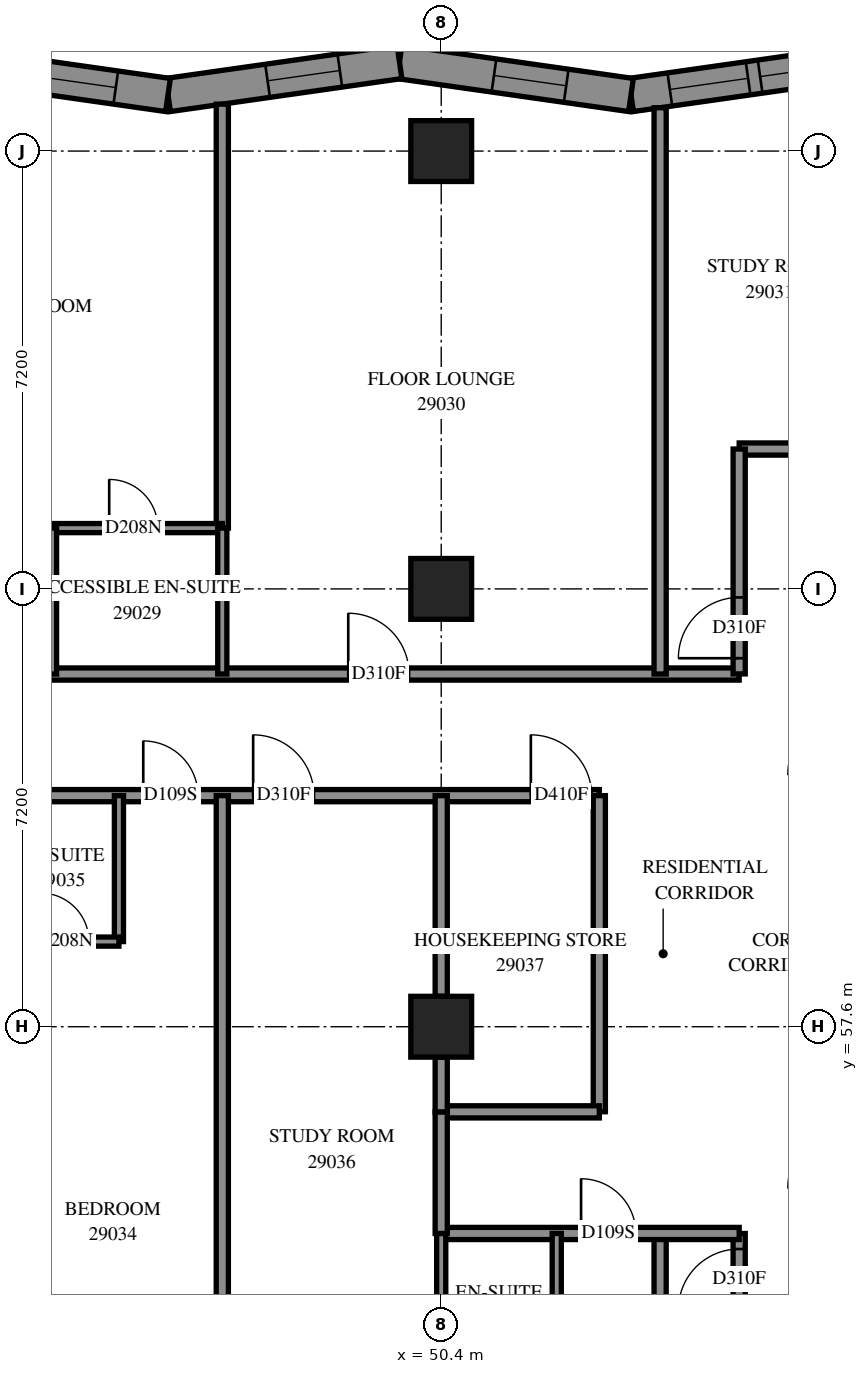
"""IFC4 building model, lengths in metres.
Left out: names, types, materials, properties, quantities, classifications, styles, units other than length and angle.
Written with IfcOpenShell. Run it as: python <this file> out.ifc"""

import sys

from ifc_helpers import new_model, si_unit, direction, frame, frame_2d, origin, origin_2d, place, context, subcontext, project, spatial, polyline, rectangle, outline, extrude, element, fill, save


model = new_model("IFC4")
c1 = context("Model", 3, precision=1e-05, world=origin(), true_north=direction((0.0, 1.0)))
c2 = subcontext(c1, "Body", "Model", "MODEL_VIEW")
j1 = project(units=[si_unit("LENGTHUNIT", "METRE"), si_unit("PLANEANGLEUNIT", "RADIAN")], contexts=[c1])
p1 = place(None, origin())
s1 = spatial("IfcSite", under=j1, at=p1, CompositionType="ELEMENT")
p2 = place(p1, origin())
s2 = spatial("IfcBuilding", under=s1, at=p2, CompositionType="ELEMENT")
p3 = place(p2, frame((0.0, 0.0, 108.4)))
s3 = spatial("IfcBuildingStorey", under=s2, at=p3, CompositionType="ELEMENT", Elevation=108.4)
for number, where, z_axis, x_axis in (
    (1, (50.4, 57.6, 0.0), (0.0, 0.0, 1.0), (1.0, 0.0, 0.0)),
    (2, (50.4, 64.8, 0.0), (0.0, 0.0, 1.0), (1.0, 0.0, 0.0)),
    (3, (50.4, 72.0, 0.0), (0.0, 0.0, 1.0), (1.0, 0.0, 0.0)),
):
    element("IfcColumn", number, at=place(p3, frame(where, z_axis=z_axis, x_axis=x_axis)), inside=s3, PredefinedType="COLUMN", context=c2, shape_type="SweptSolid", body=[
        extrude(rectangle(XDim=1.0, YDim=1.0, at=origin_2d()), origin(), (0.0, 0.0, 1.0), 3.1),
    ])
p4 = place(p3, frame((57.328, 73.464, 0.0), z_axis=(0.0, 0.0, 1.0), x_axis=(-0.990016994, -0.1409480459, 0.0)))
e4 = element("IfcWall", 4, at=p4, inside=s3, PredefinedType="SOLIDWALL", context=c2, shape_type="SweptSolid", body=[
    extrude(outline(polyline([(-0.039, -0.275), (3.806, -0.275), (3.885, 0.275), (0.039, 0.275), (-0.039, -0.275)])), origin(), (0.0, 0.0, 1.0), 3.1),
])
p5 = place(p4, frame((0.4, 0.0, 0.5)))
e5 = element("IfcOpeningElement", 5, at=p5, cuts=e4, PredefinedType="OPENING", context=c2, shape_type="SweptSolid", body=[
    extrude(rectangle(XDim=1.3, YDim=2.45, at=frame_2d((0.65, 1.225))), frame((0.0, 0.285, 0.0), z_axis=(0.0, -1.0, 0.0), x_axis=(1.0, 0.0, 0.0)), (0.0, 0.0, 1.0), 0.57),
])
p6 = place(p4, frame((1.9, 0.0, 0.5)))
e6 = element("IfcOpeningElement", 6, at=p6, cuts=e4, PredefinedType="OPENING", context=c2, shape_type="SweptSolid", body=[
    extrude(rectangle(XDim=1.3, YDim=2.45, at=frame_2d((0.65, 1.225))), frame((0.0, 0.285, 0.0), z_axis=(0.0, -1.0, 0.0), x_axis=(1.0, 0.0, 0.0)), (0.0, 0.0, 1.0), 0.57),
])
p7 = place(p3, frame((53.521, 72.922, 0.0), z_axis=(0.0, 0.0, 1.0), x_axis=(-0.990016994, 0.1409480459, 0.0)))
e7 = element("IfcWall", 7, at=p7, inside=s3, PredefinedType="SOLIDWALL", context=c2, shape_type="SweptSolid", body=[
    extrude(outline(polyline([(0.039, -0.275), (3.885, -0.275), (3.806, 0.275), (-0.039, 0.275), (0.039, -0.275)])), origin(), (0.0, 0.0, 1.0), 3.1),
])
p8 = place(p7, frame((1.076, 0.0, 0.5)))
e8 = element("IfcOpeningElement", 8, at=p8, cuts=e7, PredefinedType="OPENING", context=c2, shape_type="SweptSolid", body=[
    extrude(rectangle(XDim=1.2, YDim=2.45, at=frame_2d((0.6, 1.225))), frame((0.0, 0.285, 0.0), z_axis=(0.0, -1.0, 0.0), x_axis=(1.0, 0.0, 0.0)), (0.0, 0.0, 1.0), 0.57),
])
p9 = place(p3, frame((49.714, 73.464, 0.0), z_axis=(0.0, 0.0, 1.0), x_axis=(-0.990016994, -0.1409480459, 0.0)))
e9 = element("IfcWall", 9, at=p9, inside=s3, PredefinedType="SOLIDWALL", context=c2, shape_type="SweptSolid", body=[
    extrude(outline(polyline([(-0.039, -0.275), (3.806, -0.275), (3.885, 0.275), (0.039, 0.275), (-0.039, -0.275)])), origin(), (0.0, 0.0, 1.0), 3.1),
])
p10 = place(p9, frame((0.991, 0.0, 0.5)))
e10 = element("IfcOpeningElement", 10, at=p10, cuts=e9, PredefinedType="OPENING", context=c2, shape_type="SweptSolid", body=[
    extrude(rectangle(XDim=1.2, YDim=2.45, at=frame_2d((0.6, 1.225))), frame((0.0, 0.285, 0.0), z_axis=(0.0, -1.0, 0.0), x_axis=(1.0, 0.0, 0.0)), (0.0, 0.0, 1.0), 0.57),
])
p11 = place(p3, frame((45.907, 72.922, 0.0), z_axis=(0.0, 0.0, 1.0), x_axis=(-0.9900175106, 0.1409444172, 0.0)))
e11 = element("IfcWall", 11, at=p11, inside=s3, PredefinedType="SOLIDWALL", context=c2, shape_type="SweptSolid", body=[
    extrude(outline(polyline([(0.039, -0.275), (3.885, -0.275), (3.806, 0.275), (-0.039, 0.275), (0.039, -0.275)])), origin(), (0.0, 0.0, 1.0), 3.1),
])
p12 = place(p11, frame((0.867, 0.0, 0.5)))
e12 = element("IfcOpeningElement", 12, at=p12, cuts=e11, PredefinedType="OPENING", context=c2, shape_type="SweptSolid", body=[
    extrude(rectangle(XDim=1.2, YDim=2.45, at=frame_2d((0.6, 1.225))), frame((0.0, 0.285, 0.0), z_axis=(0.0, -1.0, 0.0), x_axis=(1.0, 0.0, 0.0)), (0.0, 0.0, 1.0), 0.57),
])
p13 = place(p3, frame((28.8, 61.4, 0.0), z_axis=(0.0, 0.0, 1.0), x_axis=(1.0, 0.0, 0.0)))
e13 = element("IfcWall", 13, at=p13, inside=s3, PredefinedType="PARTITIONING", context=c2, shape_type="SweptSolid", body=[
    extrude(rectangle(XDim=24.2, YDim=0.2, at=frame_2d((12.1, 0.0))), origin(), (0.0, 0.0, 1.0), 3.1),
])
p14 = place(p13, frame((2.3, 0.0, 0.0)))
e14 = element("IfcOpeningElement", 14, at=p14, cuts=e13, PredefinedType="OPENING", context=c2, shape_type="SweptSolid", body=[
    extrude(rectangle(XDim=0.9, YDim=2.1, at=frame_2d((0.45, 1.05))), frame((0.0, 0.11, 0.0), z_axis=(0.0, -1.0, 0.0), x_axis=(1.0, 0.0, 0.0)), (0.0, 0.0, 1.0), 0.22),
])
p15 = place(p13, frame((5.901, 0.0, 0.0)))
e15 = element("IfcOpeningElement", 15, at=p15, cuts=e13, PredefinedType="OPENING", context=c2, shape_type="SweptSolid", body=[
    extrude(rectangle(XDim=0.9, YDim=2.1, at=frame_2d((0.45, 1.05))), frame((0.0, 0.11, 0.0), z_axis=(0.0, -1.0, 0.0), x_axis=(1.0, 0.0, 0.0)), (0.0, 0.0, 1.0), 0.22),
])
p16 = place(p13, frame((11.307, 0.0, 0.0)))
e16 = element("IfcOpeningElement", 16, at=p16, cuts=e13, PredefinedType="OPENING", context=c2, shape_type="SweptSolid", body=[
    extrude(rectangle(XDim=1.0, YDim=2.1, at=frame_2d((0.5, 1.05))), frame((0.0, 0.11, 0.0), z_axis=(0.0, -1.0, 0.0), x_axis=(1.0, 0.0, 0.0)), (0.0, 0.0, 1.0), 0.22),
])
p17 = place(p13, frame((16.7, 0.0, 0.0)))
e17 = element("IfcOpeningElement", 17, at=p17, cuts=e13, PredefinedType="OPENING", context=c2, shape_type="SweptSolid", body=[
    extrude(rectangle(XDim=0.9, YDim=2.1, at=frame_2d((0.45, 1.05))), frame((0.0, 0.11, 0.0), z_axis=(0.0, -1.0, 0.0), x_axis=(1.0, 0.0, 0.0)), (0.0, 0.0, 1.0), 0.22),
])
p18 = place(p13, frame((18.508, 0.0, 0.0)))
e18 = element("IfcOpeningElement", 18, at=p18, cuts=e13, PredefinedType="OPENING", context=c2, shape_type="SweptSolid", body=[
    extrude(rectangle(XDim=1.0, YDim=2.1, at=frame_2d((0.5, 1.05))), frame((0.0, 0.11, 0.0), z_axis=(0.0, -1.0, 0.0), x_axis=(1.0, 0.0, 0.0)), (0.0, 0.0, 1.0), 0.22),
])
p19 = place(p13, frame((23.074, 0.0, 0.0)))
e19 = element("IfcOpeningElement", 19, at=p19, cuts=e13, PredefinedType="OPENING", context=c2, shape_type="SweptSolid", body=[
    extrude(rectangle(XDim=1.0, YDim=2.1, at=frame_2d((0.5, 1.05))), frame((0.0, 0.11, 0.0), z_axis=(0.0, -1.0, 0.0), x_axis=(1.0, 0.0, 0.0)), (0.0, 0.0, 1.0), 0.22),
])
p20 = place(p3, frame((33.4, 63.4, 0.0), z_axis=(0.0, 0.0, 1.0), x_axis=(1.0, 0.0, 0.0)))
e20 = element("IfcWall", 20, at=p20, inside=s3, PredefinedType="PARTITIONING", context=c2, shape_type="SweptSolid", body=[
    extrude(rectangle(XDim=21.9, YDim=0.2, at=frame_2d((10.95, 0.0))), origin(), (0.0, 0.0, 1.0), 3.1),
])
p21 = place(p20, frame((3.152, 0.0, 0.0)))
e21 = element("IfcOpeningElement", 21, at=p21, cuts=e20, PredefinedType="OPENING", context=c2, shape_type="SweptSolid", body=[
    extrude(rectangle(XDim=0.9, YDim=2.1, at=frame_2d((0.45, 1.05))), frame((0.0, 0.11, 0.0), z_axis=(0.0, -1.0, 0.0), x_axis=(1.0, 0.0, 0.0)), (0.0, 0.0, 1.0), 0.22),
])
p22 = place(p20, frame((8.161, 0.0, 0.0)))
e22 = element("IfcOpeningElement", 22, at=p22, cuts=e20, PredefinedType="OPENING", context=c2, shape_type="SweptSolid", body=[
    extrude(rectangle(XDim=0.9, YDim=2.1, at=frame_2d((0.45, 1.05))), frame((0.0, 0.11, 0.0), z_axis=(0.0, -1.0, 0.0), x_axis=(1.0, 0.0, 0.0)), (0.0, 0.0, 1.0), 0.22),
])
p23 = place(p20, frame((15.471, 0.0, 0.0)))
e23 = element("IfcOpeningElement", 23, at=p23, cuts=e20, PredefinedType="OPENING", context=c2, shape_type="SweptSolid", body=[
    extrude(rectangle(XDim=1.0, YDim=2.1, at=frame_2d((0.5, 1.05))), frame((0.0, 0.11, 0.0), z_axis=(0.0, -1.0, 0.0), x_axis=(1.0, 0.0, 0.0)), (0.0, 0.0, 1.0), 0.22),
])
p24 = place(p3, frame((55.3, 67.1, 0.0), z_axis=(0.0, 0.0, 1.0), x_axis=(1.0, 0.0, 0.0)))
e24 = element("IfcWall", 24, at=p24, inside=s3, PredefinedType="PARTITIONING", context=c2, shape_type="SweptSolid", body=[
    extrude(rectangle(XDim=19.0, YDim=0.2, at=frame_2d((9.5, 0.0))), origin(), (0.0, 0.0, 1.0), 3.1),
])
p25 = place(p24, frame((6.199, 0.0, 0.0)))
e25 = element("IfcOpeningElement", 25, at=p25, cuts=e24, PredefinedType="OPENING", context=c2, shape_type="SweptSolid", body=[
    extrude(rectangle(XDim=0.9, YDim=2.1, at=frame_2d((0.45, 1.05))), frame((0.0, 0.11, 0.0), z_axis=(0.0, -1.0, 0.0), x_axis=(1.0, 0.0, 0.0)), (0.0, 0.0, 1.0), 0.22),
])
p26 = place(p24, frame((13.399, 0.0, 0.0)))
e26 = element("IfcOpeningElement", 26, at=p26, cuts=e24, PredefinedType="OPENING", context=c2, shape_type="SweptSolid", body=[
    extrude(rectangle(XDim=0.9, YDim=2.1, at=frame_2d((0.45, 1.05))), frame((0.0, 0.11, 0.0), z_axis=(0.0, -1.0, 0.0), x_axis=(1.0, 0.0, 0.0)), (0.0, 0.0, 1.0), 0.22),
])
p27 = place(p3, frame((54.0, 42.336, 0.0), z_axis=(0.0, 0.0, 1.0), x_axis=(0.0, 1.0, 0.0)))
e27 = element("IfcWall", 27, at=p27, inside=s3, PredefinedType="PARTITIONING", context=c2, shape_type="SweptSolid", body=[
    extrude(rectangle(XDim=11.864, YDim=0.2, at=frame_2d((5.932, 0.0))), origin(), (0.0, 0.0, 1.0), 3.1),
])
p28 = place(p3, frame((46.8, 49.75, 0.0), z_axis=(0.0, 0.0, 1.0), x_axis=(0.0, 1.0, 0.0)))
e28 = element("IfcWall", 28, at=p28, inside=s3, PredefinedType="PARTITIONING", context=c2, shape_type="SweptSolid", body=[
    extrude(rectangle(XDim=11.65, YDim=0.2, at=frame_2d((5.825, 0.0))), origin(), (0.0, 0.0, 1.0), 3.1),
])
p29 = place(p3, frame((54.0, 63.4, 0.0), z_axis=(0.0, 0.0, 1.0), x_axis=(0.0, 1.0, 0.0)))
e29 = element("IfcWall", 29, at=p29, inside=s3, PredefinedType="PARTITIONING", context=c2, shape_type="SweptSolid", body=[
    extrude(rectangle(XDim=9.313, YDim=0.2, at=frame_2d((4.656, 0.0))), origin(), (0.0, 0.0, 1.0), 3.1),
])
p30 = place(p3, frame((46.8, 65.8, 0.0), z_axis=(0.0, 0.0, 1.0), x_axis=(0.0, 1.0, 0.0)))
e30 = element("IfcWall", 30, at=p30, inside=s3, PredefinedType="PARTITIONING", context=c2, shape_type="SweptSolid", body=[
    extrude(rectangle(XDim=6.972, YDim=0.2, at=frame_2d((3.486, 0.0))), origin(), (0.0, 0.0, 1.0), 3.1),
])
p31 = place(p3, frame((55.3, 48.1, 0.0), z_axis=(0.0, 0.0, 1.0), x_axis=(0.0, 1.0, 0.0)))
e31 = element("IfcWall", 31, at=p31, inside=s3, PredefinedType="PARTITIONING", context=c2, shape_type="SweptSolid", body=[
    extrude(rectangle(XDim=6.1, YDim=0.2, at=frame_2d((3.05, 0.0))), origin(), (0.0, 0.0, 1.0), 3.1),
])
p32 = place(p31, frame((4.845, 0.0, 0.0)))
e32 = element("IfcOpeningElement", 32, at=p32, cuts=e31, PredefinedType="OPENING", context=c2, shape_type="SweptSolid", body=[
    extrude(rectangle(XDim=1.0, YDim=2.1, at=frame_2d((0.5, 1.05))), frame((0.0, 0.11, 0.0), z_axis=(0.0, -1.0, 0.0), x_axis=(1.0, 0.0, 0.0)), (0.0, 0.0, 1.0), 0.22),
])
p33 = place(p3, frame((53.0, 56.202, 0.0), z_axis=(0.0, 0.0, 1.0), x_axis=(0.0, 1.0, 0.0)))
e33 = element("IfcWall", 33, at=p33, inside=s3, PredefinedType="PARTITIONING", context=c2, shape_type="SweptSolid", body=[
    extrude(rectangle(XDim=5.198, YDim=0.2, at=frame_2d((2.599, 0.0))), origin(), (0.0, 0.0, 1.0), 3.1),
])
p34 = place(p3, frame((50.4, 54.2, 0.0), z_axis=(0.0, 0.0, 1.0), x_axis=(1.0, 0.0, 0.0)))
e34 = element("IfcWall", 34, at=p34, inside=s3, PredefinedType="PARTITIONING", context=c2, shape_type="SweptSolid", body=[
    extrude(rectangle(XDim=4.9, YDim=0.2, at=frame_2d((2.45, 0.0))), origin(), (0.0, 0.0, 1.0), 3.1),
])
p35 = place(p34, frame((2.3, 0.0, 0.0)))
e35 = element("IfcOpeningElement", 35, at=p35, cuts=e34, PredefinedType="OPENING", context=c2, shape_type="SweptSolid", body=[
    extrude(rectangle(XDim=0.9, YDim=2.1, at=frame_2d((0.45, 1.05))), frame((0.0, 0.11, 0.0), z_axis=(0.0, -1.0, 0.0), x_axis=(1.0, 0.0, 0.0)), (0.0, 0.0, 1.0), 0.22),
])
p36 = place(p3, frame((55.3, 63.402, 0.0), z_axis=(0.0, 0.0, 1.0), x_axis=(0.0, 1.0, 0.0)))
e36 = element("IfcWall", 36, at=p36, inside=s3, PredefinedType="PARTITIONING", context=c2, shape_type="SweptSolid", body=[
    extrude(rectangle(XDim=3.698, YDim=0.2, at=frame_2d((1.849, 0.0))), origin(), (0.0, 0.0, 1.0), 3.1),
])
p37 = place(p36, frame((0.258, 0.0, 0.0)))
e37 = element("IfcOpeningElement", 37, at=p37, cuts=e36, PredefinedType="OPENING", context=c2, shape_type="SweptSolid", body=[
    extrude(rectangle(XDim=1.0, YDim=2.1, at=frame_2d((0.5, 1.05))), frame((0.0, 0.11, 0.0), z_axis=(0.0, -1.0, 0.0), x_axis=(1.0, 0.0, 0.0)), (0.0, 0.0, 1.0), 0.22),
])
p38 = place(p3, frame((50.4, 58.1, 0.0), z_axis=(0.0, 0.0, 1.0), x_axis=(0.0, 1.0, 0.0)))
e38 = element("IfcWall", 38, at=p38, inside=s3, PredefinedType="PARTITIONING", context=c2, shape_type="SweptSolid", body=[
    extrude(rectangle(XDim=3.3, YDim=0.2, at=frame_2d((1.65, 0.0))), origin(), (0.0, 0.0, 1.0), 3.1),
])
p39 = place(p3, frame((44.0, 65.8, 0.0), z_axis=(0.0, 0.0, 1.0), x_axis=(1.0, 0.0, 0.0)))
e39 = element("IfcWall", 39, at=p39, inside=s3, PredefinedType="PARTITIONING", context=c2, shape_type="SweptSolid", body=[
    extrude(rectangle(XDim=2.8, YDim=0.15, at=frame_2d((1.4, 0.0))), origin(), (0.0, 0.0, 1.0), 3.1),
])
p40 = place(p39, frame((0.94, 0.0, 0.0)))
e40 = element("IfcOpeningElement", 40, at=p40, cuts=e39, PredefinedType="OPENING", context=c2, shape_type="SweptSolid", body=[
    extrude(rectangle(XDim=0.8, YDim=2.1, at=frame_2d((0.4, 1.05))), frame((0.0, 0.085, 0.0), z_axis=(0.0, -1.0, 0.0), x_axis=(1.0, 0.0, 0.0)), (0.0, 0.0, 1.0), 0.17),
])
p41 = place(p3, frame((50.4, 56.2, 0.0), z_axis=(0.0, 0.0, 1.0), x_axis=(1.0, 0.0, 0.0)))
e41 = element("IfcWall", 41, at=p41, inside=s3, PredefinedType="PARTITIONING", context=c2, shape_type="SweptSolid", body=[
    extrude(rectangle(XDim=2.6, YDim=0.2, at=frame_2d((1.3, 0.0))), origin(), (0.0, 0.0, 1.0), 3.1),
])
for number, where, z_axis, x_axis in (
    (42, (52.3, 51.8, 0.0), (0.0, 0.0, 1.0), (0.0, 1.0, 0.0)),
    (43, (50.4, 51.8, 0.0), (0.0, 0.0, 1.0), (0.0, 1.0, 0.0)),
    (44, (45.1, 59.0, 0.0), (0.0, 0.0, 1.0), (0.0, 1.0, 0.0)),
    (45, (44.0, 63.4, 0.0), (0.0, 0.0, 1.0), (0.0, 1.0, 0.0)),
    (46, (46.8, 63.4, 0.0), (0.0, 0.0, 1.0), (0.0, 1.0, 0.0)),
):
    element("IfcWall", number, at=place(p3, frame(where, z_axis=z_axis, x_axis=x_axis)), inside=s3, PredefinedType="PARTITIONING", context=c2, shape_type="SweptSolid", body=[
        extrude(rectangle(XDim=2.4, YDim=0.15, at=frame_2d((1.2, 0.0))), origin(), (0.0, 0.0, 1.0), 3.1),
    ])
p42 = place(p3, frame((50.4, 54.2, 0.0), z_axis=(0.0, 0.0, 1.0), x_axis=(0.0, 1.0, 0.0)))
e47 = element("IfcWall", 47, at=p42, inside=s3, PredefinedType="PARTITIONING", context=c2, shape_type="SweptSolid", body=[
    extrude(rectangle(XDim=2.0, YDim=0.2, at=frame_2d((1.0, 0.0))), origin(), (0.0, 0.0, 1.0), 3.1),
])
p43 = place(p3, frame((43.2, 59.0, 0.0), z_axis=(0.0, 0.0, 1.0), x_axis=(1.0, 0.0, 0.0)))
e48 = element("IfcWall", 48, at=p43, inside=s3, PredefinedType="PARTITIONING", context=c2, shape_type="SweptSolid", body=[
    extrude(rectangle(XDim=1.9, YDim=0.15, at=frame_2d((0.95, 0.0))), origin(), (0.0, 0.0, 1.0), 3.1),
])
p44 = place(p43, frame((0.607, 0.0, 0.0)))
e49 = element("IfcOpeningElement", 49, at=p44, cuts=e48, PredefinedType="OPENING", context=c2, shape_type="SweptSolid", body=[
    extrude(rectangle(XDim=0.8, YDim=2.1, at=frame_2d((0.4, 1.05))), frame((0.0, 0.085, 0.0), z_axis=(0.0, -1.0, 0.0), x_axis=(1.0, 0.0, 0.0)), (0.0, 0.0, 1.0), 0.17),
])
p45 = place(p3, frame((50.4, 56.2, 0.0), z_axis=(0.0, 0.0, 1.0), x_axis=(0.0, 1.0, 0.0)))
e50 = element("IfcWall", 50, at=p45, inside=s3, PredefinedType="PARTITIONING", context=c2, shape_type="SweptSolid", body=[
    extrude(rectangle(XDim=0.9, YDim=0.2, at=frame_2d((0.45, 0.0))), origin(), (0.0, 0.0, 1.0), 3.1),
])
p46 = place(p5, origin())
e51 = element("IfcWindow", 51, at=p46, inside=s3, PartitioningType="SINGLE_PANEL", PredefinedType="WINDOW", context=c2, shape_type="SweptSolid", body=[
    extrude(rectangle(XDim=1.3, YDim=2.45, at=frame_2d((0.65, 1.225))), frame((0.0, 0.155, 0.0), z_axis=(0.0, -1.0, 0.0), x_axis=(1.0, 0.0, 0.0)), (0.0, 0.0, 1.0), 0.06),
])
fill(e5, e51)
p47 = place(p6, origin())
e52 = element("IfcWindow", 52, at=p47, inside=s3, PartitioningType="SINGLE_PANEL", PredefinedType="WINDOW", context=c2, shape_type="SweptSolid", body=[
    extrude(rectangle(XDim=1.3, YDim=2.45, at=frame_2d((0.65, 1.225))), frame((0.0, 0.155, 0.0), z_axis=(0.0, -1.0, 0.0), x_axis=(1.0, 0.0, 0.0)), (0.0, 0.0, 1.0), 0.06),
])
fill(e6, e52)
p48 = place(p8, origin())
e53 = element("IfcWindow", 53, at=p48, inside=s3, PartitioningType="SINGLE_PANEL", PredefinedType="WINDOW", context=c2, shape_type="SweptSolid", body=[
    extrude(rectangle(XDim=1.2, YDim=2.45, at=frame_2d((0.6, 1.225))), frame((0.0, 0.155, 0.0), z_axis=(0.0, -1.0, 0.0), x_axis=(1.0, 0.0, 0.0)), (0.0, 0.0, 1.0), 0.06),
])
fill(e8, e53)
p49 = place(p10, origin())
e54 = element("IfcWindow", 54, at=p49, inside=s3, PartitioningType="SINGLE_PANEL", PredefinedType="WINDOW", context=c2, shape_type="SweptSolid", body=[
    extrude(rectangle(XDim=1.2, YDim=2.45, at=frame_2d((0.6, 1.225))), frame((0.0, 0.155, 0.0), z_axis=(0.0, -1.0, 0.0), x_axis=(1.0, 0.0, 0.0)), (0.0, 0.0, 1.0), 0.06),
])
fill(e10, e54)
p50 = place(p12, origin())
e55 = element("IfcWindow", 55, at=p50, inside=s3, PartitioningType="SINGLE_PANEL", PredefinedType="WINDOW", context=c2, shape_type="SweptSolid", body=[
    extrude(rectangle(XDim=1.2, YDim=2.45, at=frame_2d((0.6, 1.225))), frame((0.0, 0.155, 0.0), z_axis=(0.0, -1.0, 0.0), x_axis=(1.0, 0.0, 0.0)), (0.0, 0.0, 1.0), 0.06),
])
fill(e12, e55)
p51 = place(p40, origin())
e56 = element("IfcDoor", 56, at=p51, inside=s3, OperationType="SINGLE_SWING_RIGHT", PredefinedType="DOOR", context=c2, shape_type="SweptSolid", body=[
    extrude(rectangle(XDim=0.8, YDim=2.1, at=frame_2d((0.4, 1.05))), frame((0.0, 0.025, 0.0), z_axis=(0.0, -1.0, 0.0), x_axis=(1.0, 0.0, 0.0)), (0.0, 0.0, 1.0), 0.05),
])
fill(e40, e56)
p52 = place(p23, origin())
e57 = element("IfcDoor", 57, at=p52, inside=s3, OperationType="SINGLE_SWING_LEFT", PredefinedType="DOOR", context=c2, shape_type="SweptSolid", body=[
    extrude(rectangle(XDim=1.0, YDim=2.1, at=frame_2d((0.5, 1.05))), frame((0.0, 0.025, 0.0), z_axis=(0.0, -1.0, 0.0), x_axis=(1.0, 0.0, 0.0)), (0.0, 0.0, 1.0), 0.05),
])
fill(e23, e57)
p53 = place(p37, origin())
e58 = element("IfcDoor", 58, at=p53, inside=s3, OperationType="SINGLE_SWING_LEFT", PredefinedType="DOOR", context=c2, shape_type="SweptSolid", body=[
    extrude(rectangle(XDim=1.0, YDim=2.1, at=frame_2d((0.5, 1.05))), frame((0.0, 0.025, 0.0), z_axis=(0.0, -1.0, 0.0), x_axis=(1.0, 0.0, 0.0)), (0.0, 0.0, 1.0), 0.05),
])
fill(e37, e58)
p54 = place(p17, origin())
e59 = element("IfcDoor", 59, at=p54, inside=s3, OperationType="SINGLE_SWING_LEFT", PredefinedType="DOOR", context=c2, shape_type="SweptSolid", body=[
    extrude(rectangle(XDim=0.9, YDim=2.1, at=frame_2d((0.45, 1.05))), frame((0.0, 0.025, 0.0), z_axis=(0.0, -1.0, 0.0), x_axis=(1.0, 0.0, 0.0)), (0.0, 0.0, 1.0), 0.05),
])
fill(e17, e59)
p55 = place(p44, origin())
e60 = element("IfcDoor", 60, at=p55, inside=s3, OperationType="SINGLE_SWING_RIGHT", PredefinedType="DOOR", context=c2, shape_type="SweptSolid", body=[
    extrude(rectangle(XDim=0.8, YDim=2.1, at=frame_2d((0.4, 1.05))), frame((0.0, 0.025, 0.0), z_axis=(0.0, -1.0, 0.0), x_axis=(1.0, 0.0, 0.0)), (0.0, 0.0, 1.0), 0.05),
])
fill(e49, e60)
p56 = place(p18, origin())
e61 = element("IfcDoor", 61, at=p56, inside=s3, OperationType="SINGLE_SWING_RIGHT", PredefinedType="DOOR", context=c2, shape_type="SweptSolid", body=[
    extrude(rectangle(XDim=1.0, YDim=2.1, at=frame_2d((0.5, 1.05))), frame((0.0, 0.025, 0.0), z_axis=(0.0, -1.0, 0.0), x_axis=(1.0, 0.0, 0.0)), (0.0, 0.0, 1.0), 0.05),
])
fill(e18, e61)
p57 = place(p19, origin())
e62 = element("IfcDoor", 62, at=p57, inside=s3, OperationType="SINGLE_SWING_LEFT", PredefinedType="DOOR", context=c2, shape_type="SweptSolid", body=[
    extrude(rectangle(XDim=1.0, YDim=2.1, at=frame_2d((0.5, 1.05))), frame((0.0, 0.025, 0.0), z_axis=(0.0, -1.0, 0.0), x_axis=(1.0, 0.0, 0.0)), (0.0, 0.0, 1.0), 0.05),
])
fill(e19, e62)
p58 = place(p35, origin())
e63 = element("IfcDoor", 63, at=p58, inside=s3, OperationType="SINGLE_SWING_LEFT", PredefinedType="DOOR", context=c2, shape_type="SweptSolid", body=[
    extrude(rectangle(XDim=0.9, YDim=2.1, at=frame_2d((0.45, 1.05))), frame((0.0, 0.025, 0.0), z_axis=(0.0, -1.0, 0.0), x_axis=(1.0, 0.0, 0.0)), (0.0, 0.0, 1.0), 0.05),
])
fill(e35, e63)
p59 = place(p32, origin())
e64 = element("IfcDoor", 64, at=p59, inside=s3, OperationType="SINGLE_SWING_RIGHT", PredefinedType="DOOR", context=c2, shape_type="SweptSolid", body=[
    extrude(rectangle(XDim=1.0, YDim=2.1, at=frame_2d((0.5, 1.05))), frame((0.0, 0.025, 0.0), z_axis=(0.0, -1.0, 0.0), x_axis=(1.0, 0.0, 0.0)), (0.0, 0.0, 1.0), 0.05),
])
fill(e32, e64)
save(model, sys.argv[1])
